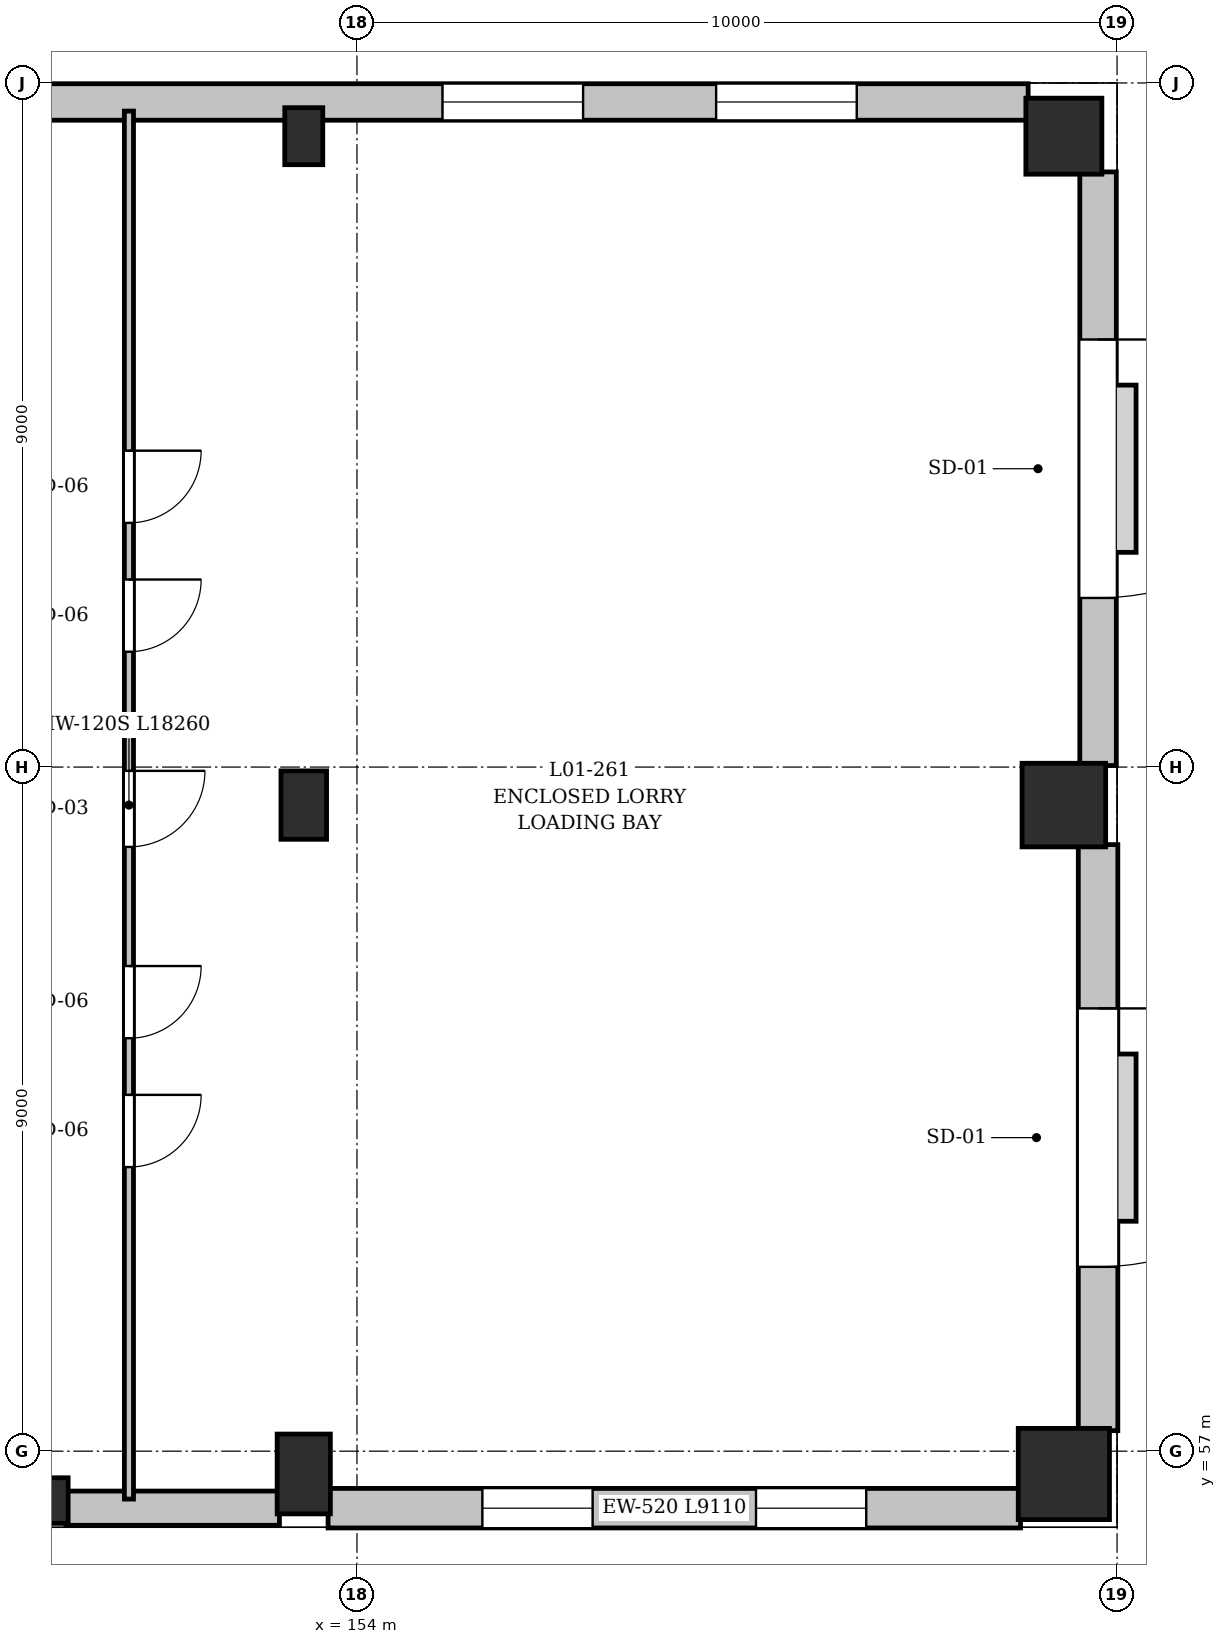
"""IFC4 building model, lengths in metres.
Left out: names, types, materials, properties, quantities, classifications, styles, units other than length and angle.
Written with IfcOpenShell. Run it as: python <this file> out.ifc"""

import sys

from ifc_helpers import new_model, si_unit, direction, frame, frame_2d, origin, origin_2d, place, context, subcontext, project, spatial, rectangle, extrude, element, fill, save


model = new_model("IFC4")
c1 = context("Model", 3, precision=1e-05, world=origin(), true_north=direction((0.0, 1.0)))
c2 = subcontext(c1, "Body", "Model", "MODEL_VIEW")
j1 = project(units=[si_unit("LENGTHUNIT", "METRE"), si_unit("PLANEANGLEUNIT", "RADIAN")], contexts=[c1])
p1 = place(None, origin())
s1 = spatial("IfcSite", under=j1, at=p1, CompositionType="ELEMENT")
p2 = place(p1, origin())
s2 = spatial("IfcBuilding", under=s1, at=p2, CompositionType="ELEMENT")
p3 = place(p2, origin())
s3 = spatial("IfcBuildingStorey", under=s2, at=p3, CompositionType="ELEMENT", Elevation=0.0)
p4 = place(p3, frame((153.3, 56.7, 0.0), z_axis=(0.0, 0.0, 1.0), x_axis=(1.0, 0.0, 0.0)))
e1 = element("IfcColumn", 1, at=p4, inside=s3, PredefinedType="COLUMN", context=c2, shape_type="SweptSolid", body=[
    extrude(rectangle(XDim=0.7, YDim=1.05, at=origin_2d()), origin(), (0.0, 0.0, 1.0), 5.05),
])
p5 = place(p3, frame((153.3, 65.5, 0.0), z_axis=(0.0, 0.0, 1.0), x_axis=(1.0, 0.0, 0.0)))
e2 = element("IfcColumn", 2, at=p5, inside=s3, PredefinedType="COLUMN", context=c2, shape_type="SweptSolid", body=[
    extrude(rectangle(XDim=0.6, YDim=0.9, at=origin_2d()), origin(), (0.0, 0.0, 1.0), 5.05),
])
p6 = place(p3, frame((153.3, 74.3, 0.0), z_axis=(0.0, 0.0, 1.0), x_axis=(1.0, 0.0, 0.0)))
e3 = element("IfcColumn", 3, at=p6, inside=s3, PredefinedType="COLUMN", context=c2, shape_type="SweptSolid", body=[
    extrude(rectangle(XDim=0.5, YDim=0.75, at=origin_2d()), origin(), (0.0, 0.0, 1.0), 5.05),
])
p7 = place(p3, frame((163.3, 56.7, 0.0), z_axis=(0.0, 0.0, 1.0), x_axis=(1.0, 0.0, 0.0)))
e4 = element("IfcColumn", 4, at=p7, inside=s3, PredefinedType="COLUMN", context=c2, shape_type="SweptSolid", body=[
    extrude(rectangle(XDim=1.2, YDim=1.2, at=origin_2d()), origin(), (0.0, 0.0, 1.0), 5.05),
])
p8 = place(p3, frame((163.3, 65.5, 0.0), z_axis=(0.0, 0.0, 1.0), x_axis=(1.0, 0.0, 0.0)))
e5 = element("IfcColumn", 5, at=p8, inside=s3, PredefinedType="COLUMN", context=c2, shape_type="SweptSolid", body=[
    extrude(rectangle(XDim=1.1, YDim=1.1, at=origin_2d()), origin(), (0.0, 0.0, 1.0), 5.05),
])
p9 = place(p3, frame((163.3, 74.3, 0.0), z_axis=(0.0, 0.0, 1.0), x_axis=(1.0, 0.0, 0.0)))
e6 = element("IfcColumn", 6, at=p9, inside=s3, PredefinedType="COLUMN", context=c2, shape_type="SweptSolid", body=[
    extrude(rectangle(XDim=1.0, YDim=1.0, at=origin_2d()), origin(), (0.0, 0.0, 1.0), 5.05),
])
p10 = place(p3, frame((150.0, 56.35, 0.0), z_axis=(0.0, 0.0, 1.0), x_axis=(1.0, 0.0, 0.0)))
e7 = element("IfcColumn", 7, at=p10, inside=s3, PredefinedType="PILASTER", context=c2, shape_type="SweptSolid", body=[
    extrude(rectangle(XDim=0.4, YDim=0.6, at=origin_2d()), origin(), (0.0, 0.0, 1.0), 5.05),
])
p11 = place(p3, frame((145.67, 74.75, 0.0), z_axis=(0.0, 0.0, 1.0), x_axis=(1.0, 0.0, 0.0)))
e8 = element("IfcWall", 8, at=p11, inside=s3, PredefinedType="SOLIDWALL", context=c2, shape_type="SweptSolid", body=[
    extrude(rectangle(XDim=17.16, YDim=0.48, at=frame_2d((8.58, 0.0))), origin(), (0.0, 0.0, 1.0), 3.74),
])
p12 = place(p11, frame((2.255, 0.0, 0.9)))
e9 = element("IfcOpeningElement", 9, at=p12, cuts=e8, PredefinedType="OPENING", context=c2, shape_type="SweptSolid", body=[
    extrude(rectangle(XDim=1.85, YDim=1.5, at=frame_2d((0.925, 0.75))), frame((0.0, 0.25, 0.0), z_axis=(0.0, -1.0, 0.0), x_axis=(1.0, 0.0, 0.0)), (0.0, 0.0, 1.0), 0.5),
])
p13 = place(p11, frame((9.455, 0.0, 0.9)))
e10 = element("IfcOpeningElement", 10, at=p13, cuts=e8, PredefinedType="OPENING", context=c2, shape_type="SweptSolid", body=[
    extrude(rectangle(XDim=1.85, YDim=1.5, at=frame_2d((0.925, 0.75))), frame((0.0, 0.25, 0.0), z_axis=(0.0, -1.0, 0.0), x_axis=(1.0, 0.0, 0.0)), (0.0, 0.0, 1.0), 0.5),
])
p14 = place(p11, frame((13.055, 0.0, 0.9)))
e11 = element("IfcOpeningElement", 11, at=p14, cuts=e8, PredefinedType="OPENING", context=c2, shape_type="SweptSolid", body=[
    extrude(rectangle(XDim=1.85, YDim=1.5, at=frame_2d((0.925, 0.75))), frame((0.0, 0.25, 0.0), z_axis=(0.0, -1.0, 0.0), x_axis=(1.0, 0.0, 0.0)), (0.0, 0.0, 1.0), 0.5),
])
p15 = place(p3, frame((163.75, 73.83, 0.0), z_axis=(0.0, 0.0, 1.0), x_axis=(0.0, -1.0, 0.0)))
e12 = element("IfcWall", 12, at=p15, inside=s3, PredefinedType="SOLIDWALL", context=c2, shape_type="SweptSolid", body=[
    extrude(rectangle(XDim=7.81, YDim=0.48, at=frame_2d((3.905, 0.0))), origin(), (0.0, 0.0, 1.0), 5.05),
])
p16 = place(p15, frame((2.205, 0.0, 0.0)))
e13 = element("IfcOpeningElement", 13, at=p16, cuts=e12, PredefinedType="OPENING", context=c2, shape_type="SweptSolid", body=[
    extrude(rectangle(XDim=3.4, YDim=3.4, at=frame_2d((1.7, 1.7))), frame((0.0, 0.25, 0.0), z_axis=(0.0, -1.0, 0.0), x_axis=(1.0, 0.0, 0.0)), (0.0, 0.0, 1.0), 0.5),
])
p17 = place(p3, frame((163.75, 64.98, 0.0), z_axis=(0.0, 0.0, 1.0), x_axis=(0.0, -1.0, 0.0)))
e14 = element("IfcWall", 14, at=p17, inside=s3, PredefinedType="SOLIDWALL", context=c2, shape_type="SweptSolid", body=[
    extrude(rectangle(XDim=7.71, YDim=0.52, at=frame_2d((3.855, 0.0))), origin(), (0.0, 0.0, 1.0), 4.59),
])
p18 = place(p17, frame((2.155, 0.0, 0.0)))
e15 = element("IfcOpeningElement", 15, at=p18, cuts=e14, PredefinedType="OPENING", context=c2, shape_type="SweptSolid", body=[
    extrude(rectangle(XDim=3.4, YDim=3.4, at=frame_2d((1.7, 1.7))), frame((0.0, 0.27, 0.0), z_axis=(0.0, -1.0, 0.0), x_axis=(1.0, 0.0, 0.0)), (0.0, 0.0, 1.0), 0.54),
])
p19 = place(p3, frame((162.73, 56.25, 0.0), z_axis=(0.0, 0.0, 1.0), x_axis=(-1.0, 0.0, 0.0)))
e16 = element("IfcWall", 16, at=p19, inside=s3, PredefinedType="SOLIDWALL", context=c2, shape_type="SweptSolid", body=[
    extrude(rectangle(XDim=9.11, YDim=0.52, at=frame_2d((4.555, 0.0))), origin(), (0.0, 0.0, 1.0), 3.84),
])
p20 = place(p19, frame((2.03, 0.0, 0.9)))
e17 = element("IfcOpeningElement", 17, at=p20, cuts=e16, PredefinedType="OPENING", context=c2, shape_type="SweptSolid", body=[
    extrude(rectangle(XDim=1.45, YDim=1.5, at=frame_2d((0.725, 0.75))), frame((0.0, 0.27, 0.0), z_axis=(0.0, -1.0, 0.0), x_axis=(1.0, 0.0, 0.0)), (0.0, 0.0, 1.0), 0.54),
])
p21 = place(p19, frame((5.63, 0.0, 0.9)))
e18 = element("IfcOpeningElement", 18, at=p21, cuts=e16, PredefinedType="OPENING", context=c2, shape_type="SweptSolid", body=[
    extrude(rectangle(XDim=1.45, YDim=1.5, at=frame_2d((0.725, 0.75))), frame((0.0, 0.27, 0.0), z_axis=(0.0, -1.0, 0.0), x_axis=(1.0, 0.0, 0.0)), (0.0, 0.0, 1.0), 0.54),
])
p22 = place(p3, frame((152.98, 56.25, 0.0), z_axis=(0.0, 0.0, 1.0), x_axis=(-1.0, 0.0, 0.0)))
e19 = element("IfcWall", 19, at=p22, inside=s3, PredefinedType="SOLIDWALL", context=c2, shape_type="SweptSolid", body=[
    extrude(rectangle(XDim=2.81, YDim=0.45, at=frame_2d((1.405, 0.0))), origin(), (0.0, 0.0, 1.0), 3.84),
])
p23 = place(p3, frame((151.0, 74.63, 0.0), z_axis=(0.0, 0.0, 1.0), x_axis=(0.0, -1.0, 0.0)))
e20 = element("IfcWall", 20, at=p23, inside=s3, PredefinedType="PARTITIONING", context=c2, shape_type="SweptSolid", body=[
    extrude(rectangle(XDim=18.26, YDim=0.12, at=frame_2d((9.13, 0.0))), origin(), (0.0, 0.0, 1.0), 3.84),
])
p24 = place(p23, frame((8.68, 0.0, 0.0)))
e21 = element("IfcOpeningElement", 21, at=p24, cuts=e20, PredefinedType="OPENING", context=c2, shape_type="SweptSolid", body=[
    extrude(rectangle(XDim=1.0, YDim=2.2, at=frame_2d((0.5, 1.1))), frame((0.0, 0.07, 0.0), z_axis=(0.0, -1.0, 0.0), x_axis=(1.0, 0.0, 0.0)), (0.0, 0.0, 1.0), 0.14),
])
p25 = place(p23, frame((6.163, 0.0, 0.0)))
e22 = element("IfcOpeningElement", 22, at=p25, cuts=e20, PredefinedType="OPENING", context=c2, shape_type="SweptSolid", body=[
    extrude(rectangle(XDim=0.95, YDim=2.2, at=frame_2d((0.475, 1.1))), frame((0.0, 0.07, 0.0), z_axis=(0.0, -1.0, 0.0), x_axis=(1.0, 0.0, 0.0)), (0.0, 0.0, 1.0), 0.14),
])
p26 = place(p23, frame((11.248, 0.0, 0.0)))
e23 = element("IfcOpeningElement", 23, at=p26, cuts=e20, PredefinedType="OPENING", context=c2, shape_type="SweptSolid", body=[
    extrude(rectangle(XDim=0.95, YDim=2.2, at=frame_2d((0.475, 1.1))), frame((0.0, 0.07, 0.0), z_axis=(0.0, -1.0, 0.0), x_axis=(1.0, 0.0, 0.0)), (0.0, 0.0, 1.0), 0.14),
])
p27 = place(p23, frame((4.468, 0.0, 0.0)))
e24 = element("IfcOpeningElement", 24, at=p27, cuts=e20, PredefinedType="OPENING", context=c2, shape_type="SweptSolid", body=[
    extrude(rectangle(XDim=0.95, YDim=2.2, at=frame_2d((0.475, 1.1))), frame((0.0, 0.07, 0.0), z_axis=(0.0, -1.0, 0.0), x_axis=(1.0, 0.0, 0.0)), (0.0, 0.0, 1.0), 0.14),
])
p28 = place(p23, frame((12.942, 0.0, 0.0)))
e25 = element("IfcOpeningElement", 25, at=p28, cuts=e20, PredefinedType="OPENING", context=c2, shape_type="SweptSolid", body=[
    extrude(rectangle(XDim=0.95, YDim=2.2, at=frame_2d((0.475, 1.1))), frame((0.0, 0.07, 0.0), z_axis=(0.0, -1.0, 0.0), x_axis=(1.0, 0.0, 0.0)), (0.0, 0.0, 1.0), 0.14),
])
p29 = place(p13, origin())
e26 = element("IfcWindow", 26, at=p29, inside=s3, PartitioningType="DOUBLE_PANEL_VERTICAL", PredefinedType="WINDOW", context=c2, shape_type="SweptSolid", body=[
    extrude(rectangle(XDim=1.85, YDim=1.5, at=frame_2d((0.925, 0.75))), frame((0.0, 0.03, 0.0), z_axis=(0.0, -1.0, 0.0), x_axis=(1.0, 0.0, 0.0)), (0.0, 0.0, 1.0), 0.06),
])
fill(e10, e26)
p30 = place(p14, origin())
e27 = element("IfcWindow", 27, at=p30, inside=s3, PartitioningType="DOUBLE_PANEL_VERTICAL", PredefinedType="WINDOW", context=c2, shape_type="SweptSolid", body=[
    extrude(rectangle(XDim=1.85, YDim=1.5, at=frame_2d((0.925, 0.75))), frame((0.0, 0.03, 0.0), z_axis=(0.0, -1.0, 0.0), x_axis=(1.0, 0.0, 0.0)), (0.0, 0.0, 1.0), 0.06),
])
fill(e11, e27)
p31 = place(p16, origin())
e28 = element("IfcDoor", 28, at=p31, inside=s3, OperationType="ROLLINGUP", PredefinedType="GATE", context=c2, shape_type="SweptSolid", body=[
    extrude(rectangle(XDim=3.4, YDim=3.4, at=frame_2d((1.7, 1.7))), frame((0.0, 0.025, 0.0), z_axis=(0.0, -1.0, 0.0), x_axis=(1.0, 0.0, 0.0)), (0.0, 0.0, 1.0), 0.05),
])
fill(e13, e28)
p32 = place(p18, origin())
e29 = element("IfcDoor", 29, at=p32, inside=s3, OperationType="ROLLINGUP", PredefinedType="GATE", context=c2, shape_type="SweptSolid", body=[
    extrude(rectangle(XDim=3.4, YDim=3.4, at=frame_2d((1.7, 1.7))), frame((0.0, 0.025, 0.0), z_axis=(0.0, -1.0, 0.0), x_axis=(1.0, 0.0, 0.0)), (0.0, 0.0, 1.0), 0.05),
])
fill(e15, e29)
p33 = place(p20, origin())
e30 = element("IfcWindow", 30, at=p33, inside=s3, PartitioningType="DOUBLE_PANEL_VERTICAL", PredefinedType="WINDOW", context=c2, shape_type="SweptSolid", body=[
    extrude(rectangle(XDim=1.45, YDim=1.5, at=frame_2d((0.725, 0.75))), frame((0.0, 0.03, 0.0), z_axis=(0.0, -1.0, 0.0), x_axis=(1.0, 0.0, 0.0)), (0.0, 0.0, 1.0), 0.06),
])
fill(e17, e30)
p34 = place(p21, origin())
e31 = element("IfcWindow", 31, at=p34, inside=s3, PartitioningType="DOUBLE_PANEL_VERTICAL", PredefinedType="WINDOW", context=c2, shape_type="SweptSolid", body=[
    extrude(rectangle(XDim=1.45, YDim=1.5, at=frame_2d((0.725, 0.75))), frame((0.0, 0.03, 0.0), z_axis=(0.0, -1.0, 0.0), x_axis=(1.0, 0.0, 0.0)), (0.0, 0.0, 1.0), 0.06),
])
fill(e18, e31)
p35 = place(p24, origin())
e32 = element("IfcDoor", 32, at=p35, inside=s3, OperationType="SINGLE_SWING_RIGHT", PredefinedType="DOOR", context=c2, shape_type="SweptSolid", body=[
    extrude(rectangle(XDim=1.0, YDim=2.2, at=frame_2d((0.5, 1.1))), frame((0.0, 0.025, 0.0), z_axis=(0.0, -1.0, 0.0), x_axis=(1.0, 0.0, 0.0)), (0.0, 0.0, 1.0), 0.05),
])
fill(e21, e32)
p36 = place(p25, origin())
e33 = element("IfcDoor", 33, at=p36, inside=s3, OperationType="SINGLE_SWING_LEFT", PredefinedType="DOOR", context=c2, shape_type="SweptSolid", body=[
    extrude(rectangle(XDim=0.95, YDim=2.2, at=frame_2d((0.475, 1.1))), frame((0.0, 0.025, 0.0), z_axis=(0.0, -1.0, 0.0), x_axis=(1.0, 0.0, 0.0)), (0.0, 0.0, 1.0), 0.05),
])
fill(e22, e33)
p37 = place(p26, origin())
e34 = element("IfcDoor", 34, at=p37, inside=s3, OperationType="SINGLE_SWING_RIGHT", PredefinedType="DOOR", context=c2, shape_type="SweptSolid", body=[
    extrude(rectangle(XDim=0.95, YDim=2.2, at=frame_2d((0.475, 1.1))), frame((0.0, 0.025, 0.0), z_axis=(0.0, -1.0, 0.0), x_axis=(1.0, 0.0, 0.0)), (0.0, 0.0, 1.0), 0.05),
])
fill(e23, e34)
p38 = place(p27, origin())
e35 = element("IfcDoor", 35, at=p38, inside=s3, OperationType="SINGLE_SWING_LEFT", PredefinedType="DOOR", context=c2, shape_type="SweptSolid", body=[
    extrude(rectangle(XDim=0.95, YDim=2.2, at=frame_2d((0.475, 1.1))), frame((0.0, 0.025, 0.0), z_axis=(0.0, -1.0, 0.0), x_axis=(1.0, 0.0, 0.0)), (0.0, 0.0, 1.0), 0.05),
])
fill(e24, e35)
p39 = place(p28, origin())
e36 = element("IfcDoor", 36, at=p39, inside=s3, OperationType="SINGLE_SWING_RIGHT", PredefinedType="DOOR", context=c2, shape_type="SweptSolid", body=[
    extrude(rectangle(XDim=0.95, YDim=2.2, at=frame_2d((0.475, 1.1))), frame((0.0, 0.025, 0.0), z_axis=(0.0, -1.0, 0.0), x_axis=(1.0, 0.0, 0.0)), (0.0, 0.0, 1.0), 0.05),
])
fill(e25, e36)
save(model, sys.argv[1])
